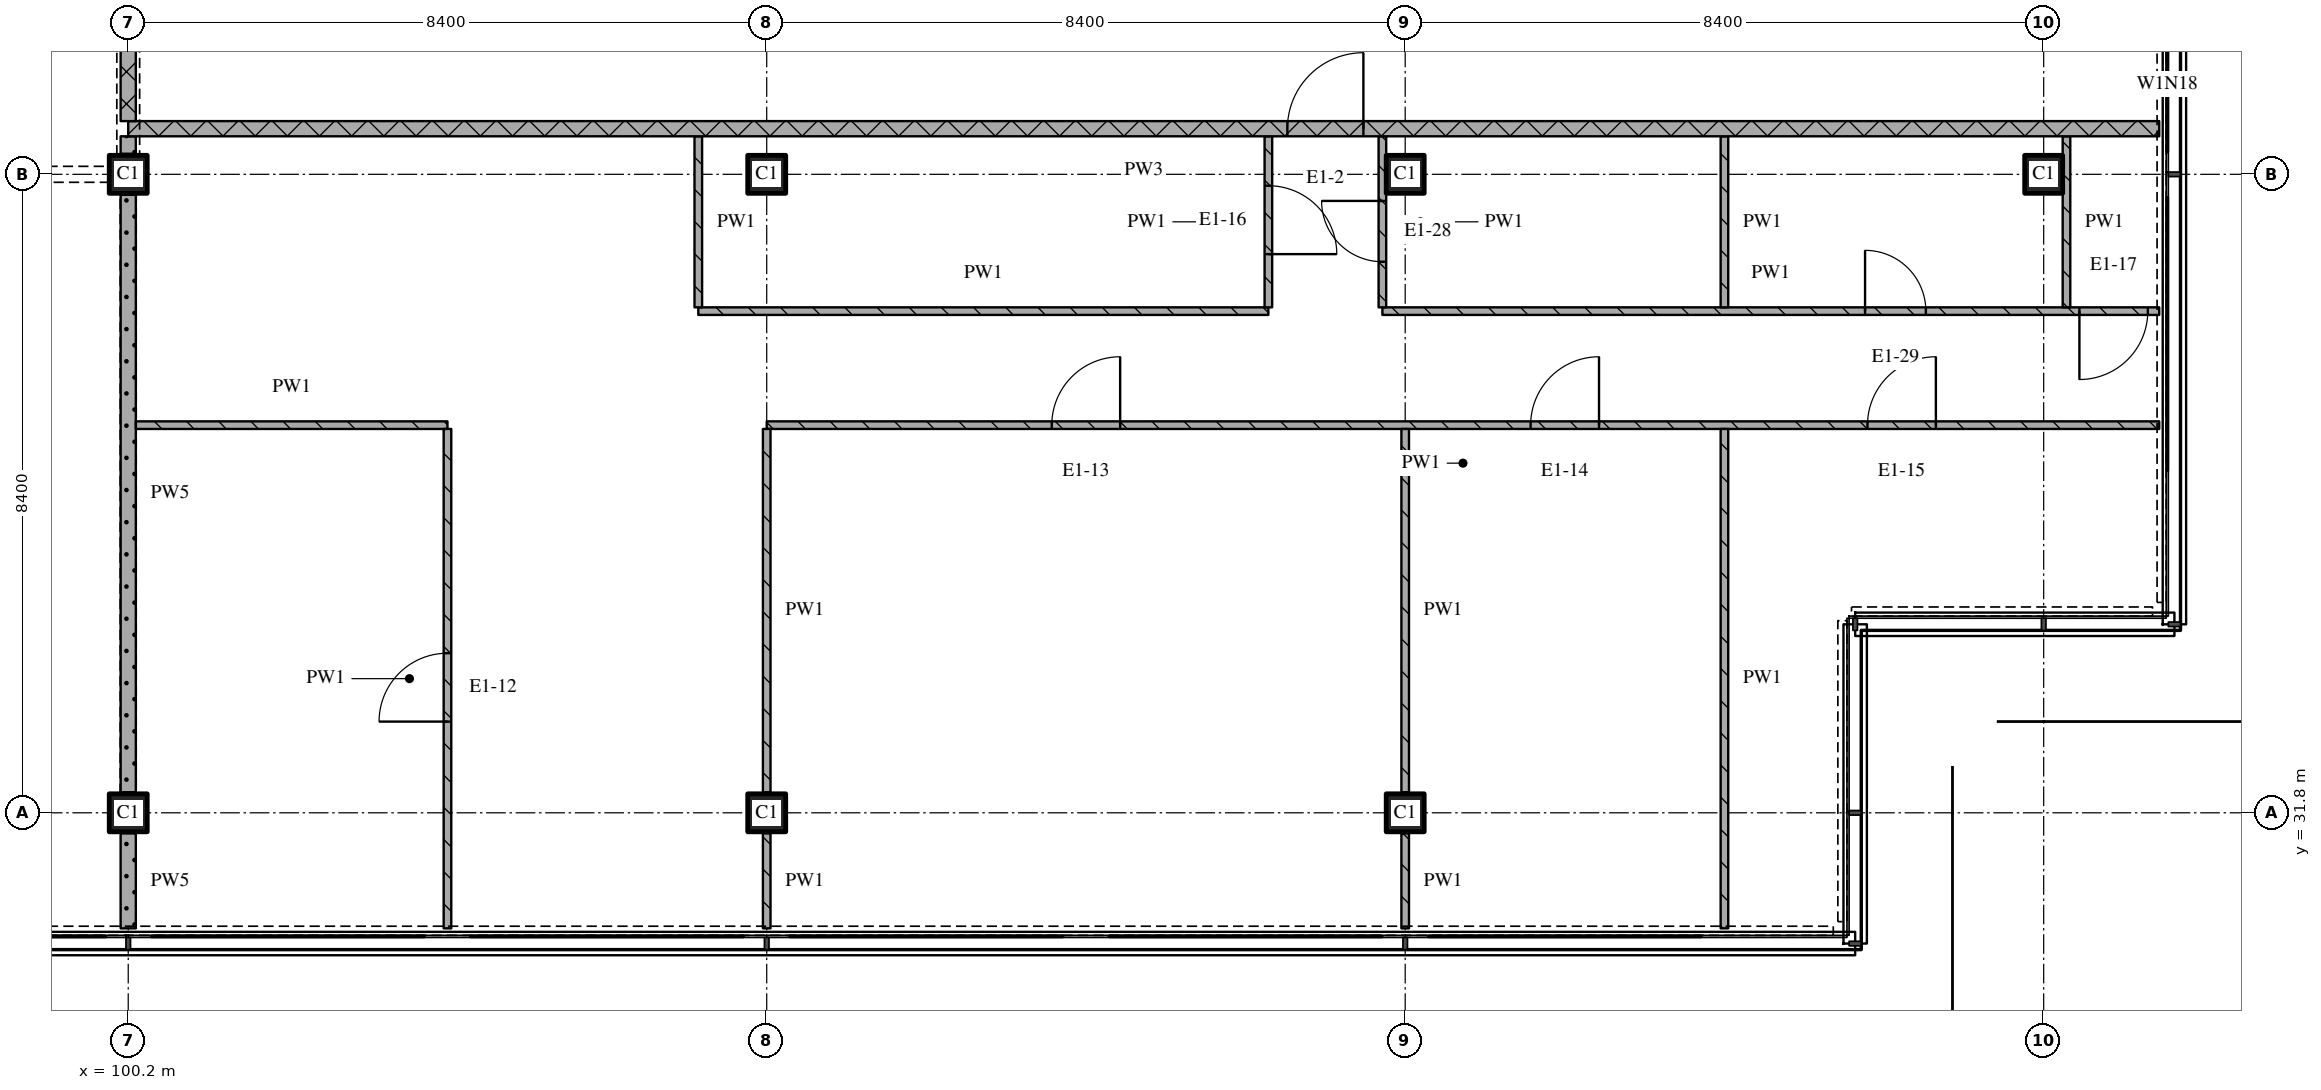
"""IFC4 building model, lengths in metres.
Left out: names, types, materials, properties, quantities, classifications, styles, units other than length and angle.
Written with IfcOpenShell. Run it as: python <this file> out.ifc"""

import sys

from ifc_helpers import new_model, si_unit, direction, frame, frame_2d, origin, origin_2d, place, context, subcontext, project, spatial, rectangle, extrude, element, fill, save


model = new_model("IFC4")
c1 = context("Model", 3, precision=1e-05, world=origin(), true_north=direction((0.0, 1.0)))
c2 = subcontext(c1, "Body", "Model", "MODEL_VIEW")
j1 = project(units=[si_unit("LENGTHUNIT", "METRE"), si_unit("PLANEANGLEUNIT", "RADIAN")], contexts=[c1])
p1 = place(None, origin())
s1 = spatial("IfcSite", under=j1, at=p1, CompositionType="ELEMENT")
p2 = place(p1, origin())
s2 = spatial("IfcBuilding", under=s1, at=p2, CompositionType="ELEMENT")
p3 = place(p2, frame((0.0, 0.0, 263.55)))
s3 = spatial("IfcBuildingStorey", under=s2, at=p3, CompositionType="ELEMENT", Elevation=263.55)
for number, where, z_axis, x_axis in (
    (1, (100.2, 31.8, 0.0), (0.0, 0.0, 1.0), (1.0, 0.0, 0.0)),
    (2, (100.2, 40.2, 0.0), (0.0, 0.0, 1.0), (1.0, 0.0, 0.0)),
    (3, (108.6, 31.8, 0.0), (0.0, 0.0, 1.0), (1.0, 0.0, 0.0)),
    (4, (108.6, 40.2, 0.0), (0.0, 0.0, 1.0), (1.0, 0.0, 0.0)),
    (5, (117.0, 31.8, 0.0), (0.0, 0.0, 1.0), (1.0, 0.0, 0.0)),
    (6, (117.0, 40.2, 0.0), (0.0, 0.0, 1.0), (1.0, 0.0, 0.0)),
    (7, (125.4, 40.2, 0.0), (0.0, 0.0, 1.0), (1.0, 0.0, 0.0)),
):
    element("IfcColumn", number, at=place(p3, frame(where, z_axis=z_axis, x_axis=x_axis)), inside=s3, PredefinedType="COLUMN", context=c2, shape_type="SweptSolid", body=[
        extrude(rectangle(XDim=0.5, YDim=0.5, at=origin_2d()), origin(), (0.0, 0.0, 1.0), 3.6),
    ])
p4 = place(p3, frame((100.3, 36.9, 0.0), z_axis=(0.0, 0.0, 1.0), x_axis=(1.0, 0.0, 0.0)))
e8 = element("IfcWall", 8, at=p4, inside=s3, PredefinedType="PARTITIONING", context=c2, shape_type="SweptSolid", body=[
    extrude(rectangle(XDim=4.1, YDim=0.1, at=frame_2d((2.05, 0.0))), origin(), (0.0, 0.0, 1.0), 3.32),
])
p5 = place(p3, frame((126.92, 36.9, 0.0), z_axis=(0.0, 0.0, 1.0), x_axis=(-1.0, 0.0, 0.0)))
e9 = element("IfcWall", 9, at=p5, inside=s3, PredefinedType="PARTITIONING", context=c2, shape_type="SweptSolid", body=[
    extrude(rectangle(XDim=18.32, YDim=0.1, at=frame_2d((9.16, 0.0))), origin(), (0.0, 0.0, 1.0), 3.32),
])
p6 = place(p5, frame((2.938, 0.0, 0.0)))
e10 = element("IfcOpeningElement", 10, at=p6, cuts=e9, PredefinedType="OPENING", context=c2, shape_type="SweptSolid", body=[
    extrude(rectangle(XDim=0.9, YDim=2.1, at=frame_2d((0.45, 1.05))), frame((0.0, 0.06, 0.0), z_axis=(0.0, -1.0, 0.0), x_axis=(1.0, 0.0, 0.0)), (0.0, 0.0, 1.0), 0.12),
])
p7 = place(p5, frame((7.37, 0.0, 0.0)))
e11 = element("IfcOpeningElement", 11, at=p7, cuts=e9, PredefinedType="OPENING", context=c2, shape_type="SweptSolid", body=[
    extrude(rectangle(XDim=0.9, YDim=2.1, at=frame_2d((0.45, 1.05))), frame((0.0, 0.06, 0.0), z_axis=(0.0, -1.0, 0.0), x_axis=(1.0, 0.0, 0.0)), (0.0, 0.0, 1.0), 0.12),
])
p8 = place(p5, frame((13.67, 0.0, 0.0)))
e12 = element("IfcOpeningElement", 12, at=p8, cuts=e9, PredefinedType="OPENING", context=c2, shape_type="SweptSolid", body=[
    extrude(rectangle(XDim=0.9, YDim=2.1, at=frame_2d((0.45, 1.05))), frame((0.0, 0.06, 0.0), z_axis=(0.0, -1.0, 0.0), x_axis=(1.0, 0.0, 0.0)), (0.0, 0.0, 1.0), 0.12),
])
p9 = place(p3, frame((107.7, 38.4, 0.0), z_axis=(0.0, 0.0, 1.0), x_axis=(1.0, 0.0, 0.0)))
e13 = element("IfcWall", 13, at=p9, inside=s3, PredefinedType="PARTITIONING", context=c2, shape_type="SweptSolid", body=[
    extrude(rectangle(XDim=7.5, YDim=0.1, at=frame_2d((3.75, 0.0))), origin(), (0.0, 0.0, 1.0), 3.32),
])
p10 = place(p3, frame((116.7, 38.4, 0.0), z_axis=(0.0, 0.0, 1.0), x_axis=(1.0, 0.0, 0.0)))
e14 = element("IfcWall", 14, at=p10, inside=s3, PredefinedType="PARTITIONING", context=c2, shape_type="SweptSolid", body=[
    extrude(rectangle(XDim=10.22, YDim=0.1, at=frame_2d((5.11, 0.0))), origin(), (0.0, 0.0, 1.0), 3.32),
])
p11 = place(p10, frame((6.35, 0.0, 0.0)))
e15 = element("IfcOpeningElement", 15, at=p11, cuts=e14, PredefinedType="OPENING", context=c2, shape_type="SweptSolid", body=[
    extrude(rectangle(XDim=0.8, YDim=2.1, at=frame_2d((0.4, 1.05))), frame((0.0, 0.06, 0.0), z_axis=(0.0, -1.0, 0.0), x_axis=(1.0, 0.0, 0.0)), (0.0, 0.0, 1.0), 0.12),
])
p12 = place(p10, frame((9.17, 0.0, 0.0)))
e16 = element("IfcOpeningElement", 16, at=p12, cuts=e14, PredefinedType="OPENING", context=c2, shape_type="SweptSolid", body=[
    extrude(rectangle(XDim=0.9, YDim=2.1, at=frame_2d((0.45, 1.05))), frame((0.0, 0.06, 0.0), z_axis=(0.0, -1.0, 0.0), x_axis=(1.0, 0.0, 0.0)), (0.0, 0.0, 1.0), 0.12),
])
p13 = place(p3, frame((126.92, 40.8, 0.0), z_axis=(0.0, 0.0, 1.0), x_axis=(-1.0, 0.0, 0.0)))
e17 = element("IfcWall", 17, at=p13, inside=s3, PredefinedType="PARTITIONING", context=c2, shape_type="SweptSolid", body=[
    extrude(rectangle(XDim=26.72, YDim=0.2, at=frame_2d((13.36, 0.0))), origin(), (0.0, 0.0, 1.0), 3.32),
])
p14 = place(p13, frame((10.47, 0.0, 0.0)))
e18 = element("IfcOpeningElement", 18, at=p14, cuts=e17, PredefinedType="OPENING", context=c2, shape_type="SweptSolid", body=[
    extrude(rectangle(XDim=1.0, YDim=2.1, at=frame_2d((0.5, 1.05))), frame((0.0, 0.11, 0.0), z_axis=(0.0, -1.0, 0.0), x_axis=(1.0, 0.0, 0.0)), (0.0, 0.0, 1.0), 0.22),
])
p15 = place(p3, frame((100.2, 43.1, 0.0), z_axis=(0.0, 0.0, 1.0), x_axis=(0.0, -1.0, 0.0)))
e19 = element("IfcWall", 19, at=p15, inside=s3, PredefinedType="PARTITIONING", context=c2, shape_type="SweptSolid", body=[
    extrude(rectangle(XDim=2.2, YDim=0.2, at=frame_2d((1.1, 0.0))), origin(), (0.0, 0.0, 1.0), 2.53),
])
p16 = place(p3, frame((100.2, 31.53, 0.0), z_axis=(0.0, 0.0, 1.0), x_axis=(0.0, -1.0, 0.0)))
e20 = element("IfcWall", 20, at=p16, inside=s3, PredefinedType="PARTITIONING", context=c2, shape_type="SweptSolid", body=[
    extrude(rectangle(XDim=1.25, YDim=0.2, at=frame_2d((0.625, 0.0))), origin(), (0.0, 0.0, 1.0), 3.32),
])
p17 = place(p3, frame((100.2, 39.93, 0.0), z_axis=(0.0, 0.0, 1.0), x_axis=(0.0, -1.0, 0.0)))
e21 = element("IfcWall", 21, at=p17, inside=s3, PredefinedType="PARTITIONING", context=c2, shape_type="SweptSolid", body=[
    extrude(rectangle(XDim=7.86, YDim=0.2, at=frame_2d((3.93, 0.0))), origin(), (0.0, 0.0, 1.0), 2.77),
])
p18 = place(p3, frame((100.2, 40.7, 0.0), z_axis=(0.0, 0.0, 1.0), x_axis=(0.0, -1.0, 0.0)))
e22 = element("IfcWall", 22, at=p18, inside=s3, PredefinedType="PARTITIONING", context=c2, shape_type="SweptSolid", body=[
    extrude(rectangle(XDim=0.23, YDim=0.2, at=frame_2d((0.115, 0.0))), origin(), (0.0, 0.0, 1.0), 3.32),
])
p19 = place(p3, frame((104.4, 30.28, 0.0), z_axis=(0.0, 0.0, 1.0), x_axis=(0.0, 1.0, 0.0)))
e23 = element("IfcWall", 23, at=p19, inside=s3, PredefinedType="PARTITIONING", context=c2, shape_type="SweptSolid", body=[
    extrude(rectangle(XDim=6.57, YDim=0.1, at=frame_2d((3.285, 0.0))), origin(), (0.0, 0.0, 1.0), 3.32),
])
p20 = place(p19, frame((2.72, 0.0, 0.0)))
e24 = element("IfcOpeningElement", 24, at=p20, cuts=e23, PredefinedType="OPENING", context=c2, shape_type="SweptSolid", body=[
    extrude(rectangle(XDim=0.9, YDim=2.1, at=frame_2d((0.45, 1.05))), frame((0.0, 0.06, 0.0), z_axis=(0.0, -1.0, 0.0), x_axis=(1.0, 0.0, 0.0)), (0.0, 0.0, 1.0), 0.12),
])
p21 = place(p3, frame((107.7, 40.7, 0.0), z_axis=(0.0, 0.0, 1.0), x_axis=(0.0, -1.0, 0.0)))
e25 = element("IfcWall", 25, at=p21, inside=s3, PredefinedType="PARTITIONING", context=c2, shape_type="SweptSolid", body=[
    extrude(rectangle(XDim=2.25, YDim=0.1, at=frame_2d((1.125, 0.0))), origin(), (0.0, 0.0, 1.0), 3.32),
])
p22 = place(p3, frame((108.6, 31.53, 0.0), z_axis=(0.0, 0.0, 1.0), x_axis=(0.0, -1.0, 0.0)))
e26 = element("IfcWall", 26, at=p22, inside=s3, PredefinedType="PARTITIONING", context=c2, shape_type="SweptSolid", body=[
    extrude(rectangle(XDim=1.25, YDim=0.1, at=frame_2d((0.625, 0.0))), origin(), (0.0, 0.0, 1.0), 3.32),
])
p23 = place(p3, frame((108.6, 36.85, 0.0), z_axis=(0.0, 0.0, 1.0), x_axis=(0.0, -1.0, 0.0)))
e27 = element("IfcWall", 27, at=p23, inside=s3, PredefinedType="PARTITIONING", context=c2, shape_type="SweptSolid", body=[
    extrude(rectangle(XDim=4.78, YDim=0.1, at=frame_2d((2.39, 0.0))), origin(), (0.0, 0.0, 1.0), 3.32),
])
p24 = place(p3, frame((115.2, 38.45, 0.0), z_axis=(0.0, 0.0, 1.0), x_axis=(0.0, 1.0, 0.0)))
e28 = element("IfcWall", 28, at=p24, inside=s3, PredefinedType="PARTITIONING", context=c2, shape_type="SweptSolid", body=[
    extrude(rectangle(XDim=2.25, YDim=0.1, at=frame_2d((1.125, 0.0))), origin(), (0.0, 0.0, 1.0), 3.32),
])
p25 = place(p24, frame((0.7, 0.0, 0.0)))
e29 = element("IfcOpeningElement", 29, at=p25, cuts=e28, PredefinedType="OPENING", context=c2, shape_type="SweptSolid", body=[
    extrude(rectangle(XDim=0.9, YDim=2.1, at=frame_2d((0.45, 1.05))), frame((0.0, 0.06, 0.0), z_axis=(0.0, -1.0, 0.0), x_axis=(1.0, 0.0, 0.0)), (0.0, 0.0, 1.0), 0.12),
])
p26 = place(p3, frame((116.7, 40.7, 0.0), z_axis=(0.0, 0.0, 1.0), x_axis=(0.0, -1.0, 0.0)))
e30 = element("IfcWall", 30, at=p26, inside=s3, PredefinedType="PARTITIONING", context=c2, shape_type="SweptSolid", body=[
    extrude(rectangle(XDim=2.25, YDim=0.1, at=frame_2d((1.125, 0.0))), origin(), (0.0, 0.0, 1.0), 3.32),
])
p27 = place(p26, frame((0.85, 0.0, 0.0)))
e31 = element("IfcOpeningElement", 31, at=p27, cuts=e30, PredefinedType="OPENING", context=c2, shape_type="SweptSolid", body=[
    extrude(rectangle(XDim=0.8, YDim=2.1, at=frame_2d((0.4, 1.05))), frame((0.0, 0.06, 0.0), z_axis=(0.0, -1.0, 0.0), x_axis=(1.0, 0.0, 0.0)), (0.0, 0.0, 1.0), 0.12),
])
p28 = place(p3, frame((117.0, 31.53, 0.0), z_axis=(0.0, 0.0, 1.0), x_axis=(0.0, -1.0, 0.0)))
e32 = element("IfcWall", 32, at=p28, inside=s3, PredefinedType="PARTITIONING", context=c2, shape_type="SweptSolid", body=[
    extrude(rectangle(XDim=1.25, YDim=0.1, at=frame_2d((0.625, 0.0))), origin(), (0.0, 0.0, 1.0), 3.32),
])
p29 = place(p3, frame((117.0, 36.85, 0.0), z_axis=(0.0, 0.0, 1.0), x_axis=(0.0, -1.0, 0.0)))
e33 = element("IfcWall", 33, at=p29, inside=s3, PredefinedType="PARTITIONING", context=c2, shape_type="SweptSolid", body=[
    extrude(rectangle(XDim=4.78, YDim=0.1, at=frame_2d((2.39, 0.0))), origin(), (0.0, 0.0, 1.0), 3.32),
])
p30 = place(p3, frame((121.2, 36.85, 0.0), z_axis=(0.0, 0.0, 1.0), x_axis=(0.0, -1.0, 0.0)))
e34 = element("IfcWall", 34, at=p30, inside=s3, PredefinedType="PARTITIONING", context=c2, shape_type="SweptSolid", body=[
    extrude(rectangle(XDim=6.57, YDim=0.1, at=frame_2d((3.285, 0.0))), origin(), (0.0, 0.0, 1.0), 3.32),
])
for number, where, z_axis, x_axis in (
    (35, (121.2, 40.7, 0.0), (0.0, 0.0, 1.0), (0.0, -1.0, 0.0)),
    (36, (125.7, 40.7, 0.0), (0.0, 0.0, 1.0), (0.0, -1.0, 0.0)),
):
    element("IfcWall", number, at=place(p3, frame(where, z_axis=z_axis, x_axis=x_axis)), inside=s3, PredefinedType="PARTITIONING", context=c2, shape_type="SweptSolid", body=[
        extrude(rectangle(XDim=2.25, YDim=0.1, at=frame_2d((1.125, 0.0))), origin(), (0.0, 0.0, 1.0), 3.32),
    ])
p31 = place(p6, origin())
e37 = element("IfcDoor", 37, at=p31, inside=s3, OperationType="SINGLE_SWING_RIGHT", PredefinedType="DOOR", context=c2, shape_type="SweptSolid", body=[
    extrude(rectangle(XDim=0.9, YDim=2.1, at=frame_2d((0.45, 1.05))), frame((0.0, 0.025, 0.0), z_axis=(0.0, -1.0, 0.0), x_axis=(1.0, 0.0, 0.0)), (0.0, 0.0, 1.0), 0.05),
])
fill(e10, e37)
p32 = place(p7, origin())
e38 = element("IfcDoor", 38, at=p32, inside=s3, OperationType="SINGLE_SWING_RIGHT", PredefinedType="DOOR", context=c2, shape_type="SweptSolid", body=[
    extrude(rectangle(XDim=0.9, YDim=2.1, at=frame_2d((0.45, 1.05))), frame((0.0, 0.025, 0.0), z_axis=(0.0, -1.0, 0.0), x_axis=(1.0, 0.0, 0.0)), (0.0, 0.0, 1.0), 0.05),
])
fill(e11, e38)
p33 = place(p8, origin())
e39 = element("IfcDoor", 39, at=p33, inside=s3, OperationType="SINGLE_SWING_RIGHT", PredefinedType="DOOR", context=c2, shape_type="SweptSolid", body=[
    extrude(rectangle(XDim=0.9, YDim=2.1, at=frame_2d((0.45, 1.05))), frame((0.0, 0.025, 0.0), z_axis=(0.0, -1.0, 0.0), x_axis=(1.0, 0.0, 0.0)), (0.0, 0.0, 1.0), 0.05),
])
fill(e12, e39)
p34 = place(p11, origin())
e40 = element("IfcDoor", 40, at=p34, inside=s3, OperationType="SINGLE_SWING_LEFT", PredefinedType="DOOR", context=c2, shape_type="SweptSolid", body=[
    extrude(rectangle(XDim=0.8, YDim=2.1, at=frame_2d((0.4, 1.05))), frame((0.0, 0.025, 0.0), z_axis=(0.0, -1.0, 0.0), x_axis=(1.0, 0.0, 0.0)), (0.0, 0.0, 1.0), 0.05),
])
fill(e15, e40)
p35 = place(p12, origin())
e41 = element("IfcDoor", 41, at=p35, inside=s3, OperationType="SINGLE_SWING_RIGHT", PredefinedType="DOOR", context=c2, shape_type="SweptSolid", body=[
    extrude(rectangle(XDim=0.9, YDim=2.1, at=frame_2d((0.45, 1.05))), frame((0.0, 0.025, 0.0), z_axis=(0.0, -1.0, 0.0), x_axis=(1.0, 0.0, 0.0)), (0.0, 0.0, 1.0), 0.05),
])
fill(e16, e41)
p36 = place(p14, origin())
e42 = element("IfcDoor", 42, at=p36, inside=s3, OperationType="SINGLE_SWING_RIGHT", PredefinedType="DOOR", context=c2, shape_type="SweptSolid", body=[
    extrude(rectangle(XDim=1.0, YDim=2.1, at=frame_2d((0.5, 1.05))), frame((0.0, 0.025, 0.0), z_axis=(0.0, -1.0, 0.0), x_axis=(1.0, 0.0, 0.0)), (0.0, 0.0, 1.0), 0.05),
])
fill(e18, e42)
p37 = place(p20, origin())
e43 = element("IfcDoor", 43, at=p37, inside=s3, OperationType="SINGLE_SWING_LEFT", PredefinedType="DOOR", context=c2, shape_type="SweptSolid", body=[
    extrude(rectangle(XDim=0.9, YDim=2.1, at=frame_2d((0.45, 1.05))), frame((0.0, 0.025, 0.0), z_axis=(0.0, -1.0, 0.0), x_axis=(1.0, 0.0, 0.0)), (0.0, 0.0, 1.0), 0.05),
])
fill(e24, e43)
p38 = place(p25, origin())
e44 = element("IfcDoor", 44, at=p38, inside=s3, OperationType="SINGLE_SWING_RIGHT", PredefinedType="DOOR", context=c2, shape_type="SweptSolid", body=[
    extrude(rectangle(XDim=0.9, YDim=2.1, at=frame_2d((0.45, 1.05))), frame((0.0, 0.025, 0.0), z_axis=(0.0, -1.0, 0.0), x_axis=(1.0, 0.0, 0.0)), (0.0, 0.0, 1.0), 0.05),
])
fill(e29, e44)
p39 = place(p27, origin())
e45 = element("IfcDoor", 45, at=p39, inside=s3, OperationType="SINGLE_SWING_RIGHT", PredefinedType="DOOR", context=c2, shape_type="SweptSolid", body=[
    extrude(rectangle(XDim=0.8, YDim=2.1, at=frame_2d((0.4, 1.05))), frame((0.0, 0.025, 0.0), z_axis=(0.0, -1.0, 0.0), x_axis=(1.0, 0.0, 0.0)), (0.0, 0.0, 1.0), 0.05),
])
fill(e31, e45)
save(model, sys.argv[1])
